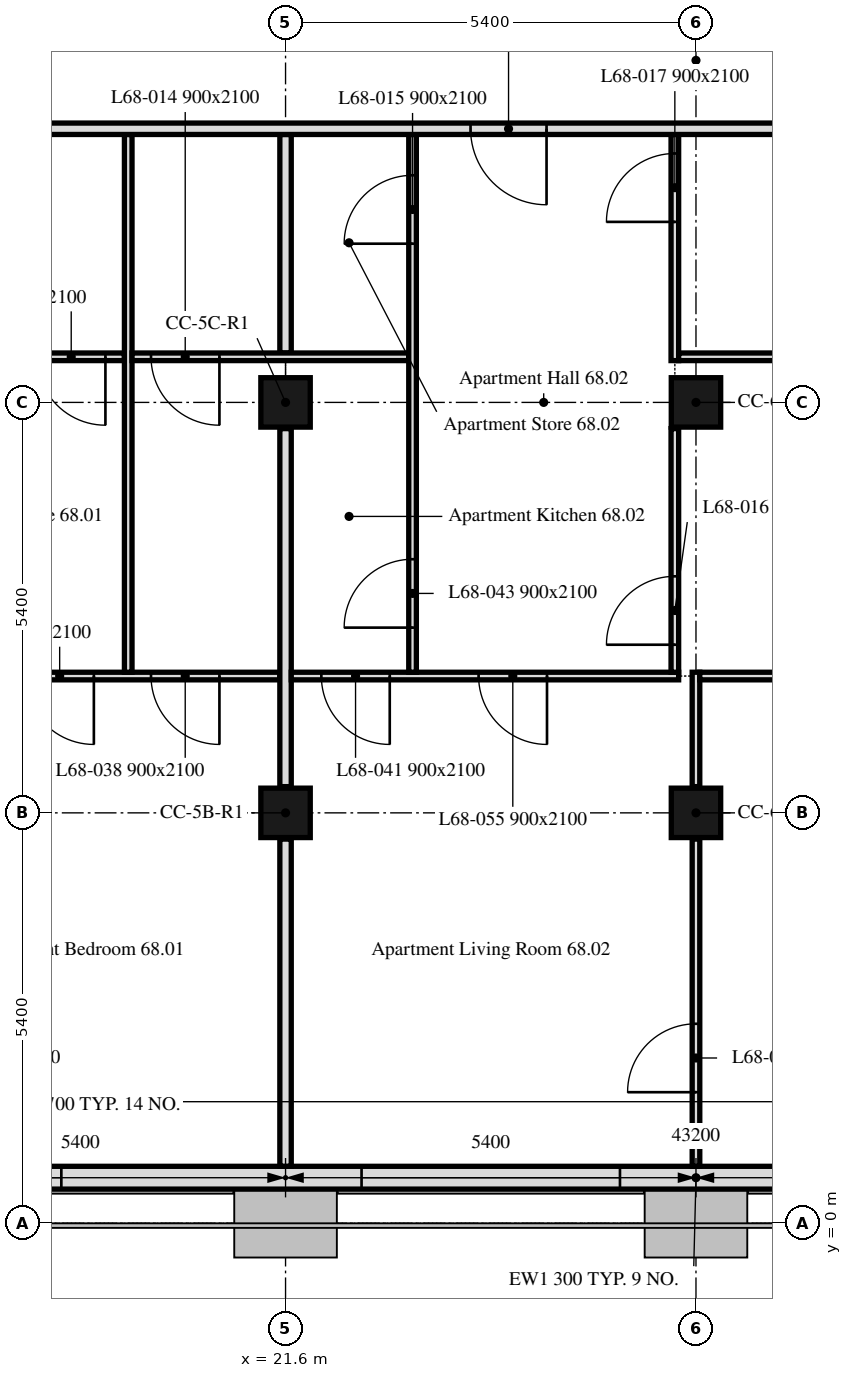
"""IFC4 building model, lengths in metres.
Left out: names, types, materials, properties, quantities, classifications, styles, units other than length and angle.
Written with IfcOpenShell. Run it as: python <this file> out.ifc"""

import sys

from ifc_helpers import new_model, si_unit, direction, frame, frame_2d, origin, origin_2d, place, context, subcontext, project, spatial, rectangle, extrude, element, fill, save


model = new_model("IFC4")
c1 = context("Model", 3, precision=1e-05, world=origin(), true_north=direction((0.0, 1.0)))
c2 = subcontext(c1, "Body", "Model", "MODEL_VIEW")
j1 = project(units=[si_unit("LENGTHUNIT", "METRE"), si_unit("PLANEANGLEUNIT", "RADIAN")], contexts=[c1])
p1 = place(None, origin())
s1 = spatial("IfcSite", under=j1, at=p1, CompositionType="ELEMENT")
p2 = place(p1, origin())
s2 = spatial("IfcBuilding", under=s1, at=p2, CompositionType="ELEMENT")
p3 = place(p2, frame((0.0, 0.0, 278.5)))
s3 = spatial("IfcBuildingStorey", under=s2, at=p3, CompositionType="ELEMENT", Elevation=278.5)
for number, where, z_axis, x_axis in (
    (1, (21.6, 5.4, 0.0), (0.0, 0.0, 1.0), (1.0, 0.0, 0.0)),
    (2, (27.0, 5.4, 0.0), (0.0, 0.0, 1.0), (1.0, 0.0, 0.0)),
    (3, (21.6, 10.8, 0.0), (0.0, 0.0, 1.0), (1.0, 0.0, 0.0)),
    (4, (27.0, 10.8, 0.0), (0.0, 0.0, 1.0), (1.0, 0.0, 0.0)),
):
    element("IfcColumn", number, at=place(p3, frame(where, z_axis=z_axis, x_axis=x_axis)), inside=s3, PredefinedType="COLUMN", context=c2, shape_type="SweptSolid", body=[
        extrude(rectangle(XDim=0.65, YDim=0.65, at=origin_2d()), origin(), (0.0, 0.0, 1.0), 3.0),
    ])
p4 = place(p3, frame((10.986, 0.6, 0.0), z_axis=(0.0, 0.0, 1.0), x_axis=(1.0, 0.0, 0.0)))
e5 = element("IfcWall", 5, at=p4, inside=s3, PredefinedType="SOLIDWALL", context=c2, shape_type="SweptSolid", body=[
    extrude(rectangle(XDim=32.027, YDim=0.3, at=frame_2d((16.014, 0.0))), origin(), (0.0, 0.0, 1.0), 3.0),
])
p5 = place(p4, frame((0.814, 0.0, 0.9)))
e6 = element("IfcOpeningElement", 6, at=p5, cuts=e5, PredefinedType="OPENING", context=c2, shape_type="SweptSolid", body=[
    extrude(rectangle(XDim=3.4, YDim=1.7, at=frame_2d((1.7, 0.85))), frame((0.0, 0.16, 0.0), z_axis=(0.0, -1.0, 0.0), x_axis=(1.0, 0.0, 0.0)), (0.0, 0.0, 1.0), 0.32),
])
p6 = place(p4, frame((6.564, 0.0, 0.9)))
e7 = element("IfcOpeningElement", 7, at=p6, cuts=e5, PredefinedType="OPENING", context=c2, shape_type="SweptSolid", body=[
    extrude(rectangle(XDim=1.1, YDim=1.7, at=frame_2d((0.55, 0.85))), frame((0.0, 0.16, 0.0), z_axis=(0.0, -1.0, 0.0), x_axis=(1.0, 0.0, 0.0)), (0.0, 0.0, 1.0), 0.32),
])
p7 = place(p4, frame((11.614, 0.0, 0.9)))
e8 = element("IfcOpeningElement", 8, at=p7, cuts=e5, PredefinedType="OPENING", context=c2, shape_type="SweptSolid", body=[
    extrude(rectangle(XDim=3.4, YDim=1.7, at=frame_2d((1.7, 0.85))), frame((0.0, 0.16, 0.0), z_axis=(0.0, -1.0, 0.0), x_axis=(1.0, 0.0, 0.0)), (0.0, 0.0, 1.0), 0.32),
])
p8 = place(p4, frame((17.364, 0.0, 0.9)))
e9 = element("IfcOpeningElement", 9, at=p8, cuts=e5, PredefinedType="OPENING", context=c2, shape_type="SweptSolid", body=[
    extrude(rectangle(XDim=1.1, YDim=1.7, at=frame_2d((0.55, 0.85))), frame((0.0, 0.16, 0.0), z_axis=(0.0, -1.0, 0.0), x_axis=(1.0, 0.0, 0.0)), (0.0, 0.0, 1.0), 0.32),
])
p9 = place(p4, frame((22.414, 0.0, 0.9)))
e10 = element("IfcOpeningElement", 10, at=p9, cuts=e5, PredefinedType="OPENING", context=c2, shape_type="SweptSolid", body=[
    extrude(rectangle(XDim=3.4, YDim=1.7, at=frame_2d((1.7, 0.85))), frame((0.0, 0.16, 0.0), z_axis=(0.0, -1.0, 0.0), x_axis=(1.0, 0.0, 0.0)), (0.0, 0.0, 1.0), 0.32),
])
p10 = place(p4, frame((28.164, 0.0, 0.9)))
e11 = element("IfcOpeningElement", 11, at=p10, cuts=e5, PredefinedType="OPENING", context=c2, shape_type="SweptSolid", body=[
    extrude(rectangle(XDim=1.1, YDim=1.7, at=frame_2d((0.55, 0.85))), frame((0.0, 0.16, 0.0), z_axis=(0.0, -1.0, 0.0), x_axis=(1.0, 0.0, 0.0)), (0.0, 0.0, 1.0), 0.32),
])
p11 = place(p3, frame((21.6, 0.751, 0.0), z_axis=(0.0, 0.0, 1.0), x_axis=(0.0, 1.0, 0.0)))
e12 = element("IfcWall", 12, at=p11, inside=s3, PredefinedType="PARTITIONING", context=c2, shape_type="SweptSolid", body=[
    extrude(rectangle(XDim=4.304, YDim=0.15, at=frame_2d((2.152, 0.0))), origin(), (0.0, 0.0, 1.0), 2.4),
])
p12 = place(p3, frame((21.525, 7.2, 0.0), z_axis=(0.0, 0.0, 1.0), x_axis=(-1.0, 0.0, 0.0)))
e13 = element("IfcWall", 13, at=p12, inside=s3, PredefinedType="PARTITIONING", context=c2, shape_type="SweptSolid", body=[
    extrude(rectangle(XDim=5.275, YDim=0.1, at=frame_2d((2.637, 0.0))), origin(), (0.0, 0.0, 1.0), 3.0),
])
p13 = place(p12, frame((2.447, 0.0, 0.0)))
e14 = element("IfcOpeningElement", 14, at=p13, cuts=e13, PredefinedType="OPENING", context=c2, shape_type="SweptSolid", body=[
    extrude(rectangle(XDim=0.9, YDim=2.1, at=frame_2d((0.45, 1.05))), frame((0.0, 0.05, 0.0), z_axis=(0.0, -1.0, 0.0), x_axis=(1.0, 0.0, 0.0)), (0.0, 0.0, 1.0), 0.1),
])
p14 = place(p12, frame((0.795, 0.0, 0.0)))
e15 = element("IfcOpeningElement", 15, at=p14, cuts=e13, PredefinedType="OPENING", context=c2, shape_type="SweptSolid", body=[
    extrude(rectangle(XDim=0.9, YDim=2.1, at=frame_2d((0.45, 1.05))), frame((0.0, 0.05, 0.0), z_axis=(0.0, -1.0, 0.0), x_axis=(1.0, 0.0, 0.0)), (0.0, 0.0, 1.0), 0.1),
])
p15 = place(p3, frame((19.48, 11.4, 0.0), z_axis=(0.0, 0.0, 1.0), x_axis=(-1.0, 0.0, 0.0)))
e16 = element("IfcWall", 16, at=p15, inside=s3, PredefinedType="PARTITIONING", context=c2, shape_type="SweptSolid", body=[
    extrude(rectangle(XDim=3.35, YDim=0.1, at=frame_2d((1.675, 0.0))), origin(), (0.0, 0.0, 1.0), 3.0),
])
p16 = place(p15, frame((0.25, 0.0, 0.0)))
e17 = element("IfcOpeningElement", 17, at=p16, cuts=e16, PredefinedType="OPENING", context=c2, shape_type="SweptSolid", body=[
    extrude(rectangle(XDim=0.9, YDim=2.1, at=frame_2d((0.45, 1.05))), frame((0.0, 0.05, 0.0), z_axis=(0.0, -1.0, 0.0), x_axis=(1.0, 0.0, 0.0)), (0.0, 0.0, 1.0), 0.1),
])
p17 = place(p3, frame((19.53, 7.25, 0.0), z_axis=(0.0, 0.0, 1.0), x_axis=(0.0, 1.0, 0.0)))
e18 = element("IfcWall", 18, at=p17, inside=s3, PredefinedType="PARTITIONING", context=c2, shape_type="SweptSolid", body=[
    extrude(rectangle(XDim=7.075, YDim=0.1, at=frame_2d((3.538, 0.0))), origin(), (0.0, 0.0, 1.0), 3.0),
])
p18 = place(p3, frame((21.6, 5.745, 0.0), z_axis=(0.0, 0.0, 1.0), x_axis=(0.0, 1.0, 0.0)))
e19 = element("IfcWall", 19, at=p18, inside=s3, PredefinedType="PARTITIONING", context=c2, shape_type="SweptSolid", body=[
    extrude(rectangle(XDim=4.71, YDim=0.15, at=frame_2d((2.355, 0.0))), origin(), (0.0, 0.0, 1.0), 2.4),
])
p19 = place(p3, frame((21.6, 11.45, 0.0), z_axis=(0.0, 0.0, 1.0), x_axis=(0.0, 1.0, 0.0)))
e20 = element("IfcWall", 20, at=p19, inside=s3, PredefinedType="PARTITIONING", context=c2, shape_type="SweptSolid", body=[
    extrude(rectangle(XDim=2.875, YDim=0.15, at=frame_2d((1.438, 0.0))), origin(), (0.0, 0.0, 1.0), 2.4),
])
p20 = place(p3, frame((27.0, 0.751, 0.0), z_axis=(0.0, 0.0, 1.0), x_axis=(0.0, 1.0, 0.0)))
e21 = element("IfcWall", 21, at=p20, inside=s3, PredefinedType="PARTITIONING", context=c2, shape_type="SweptSolid", body=[
    extrude(rectangle(XDim=4.304, YDim=0.1, at=frame_2d((2.152, 0.0))), origin(), (0.0, 0.0, 1.0), 2.4),
])
p21 = place(p20, frame((0.974, 0.0, 0.0)))
e22 = element("IfcOpeningElement", 22, at=p21, cuts=e21, PredefinedType="OPENING", context=c2, shape_type="SweptSolid", body=[
    extrude(rectangle(XDim=0.9, YDim=2.1, at=frame_2d((0.45, 1.05))), frame((0.0, 0.05, 0.0), z_axis=(0.0, -1.0, 0.0), x_axis=(1.0, 0.0, 0.0)), (0.0, 0.0, 1.0), 0.1),
])
p22 = place(p3, frame((27.0, 5.745, 0.0), z_axis=(0.0, 0.0, 1.0), x_axis=(0.0, 1.0, 0.0)))
e23 = element("IfcWall", 23, at=p22, inside=s3, PredefinedType="PARTITIONING", context=c2, shape_type="SweptSolid", body=[
    extrude(rectangle(XDim=1.505, YDim=0.1, at=frame_2d((0.752, 0.0))), origin(), (0.0, 0.0, 1.0), 2.4),
])
p23 = place(p3, frame((26.772, 7.2, 0.0), z_axis=(0.0, 0.0, 1.0), x_axis=(-1.0, 0.0, 0.0)))
e24 = element("IfcWall", 24, at=p23, inside=s3, PredefinedType="PARTITIONING", context=c2, shape_type="SweptSolid", body=[
    extrude(rectangle(XDim=5.097, YDim=0.1, at=frame_2d((2.548, 0.0))), origin(), (0.0, 0.0, 1.0), 3.0),
])
p24 = place(p23, frame((3.801, 0.0, 0.0)))
e25 = element("IfcOpeningElement", 25, at=p24, cuts=e24, PredefinedType="OPENING", context=c2, shape_type="SweptSolid", body=[
    extrude(rectangle(XDim=0.9, YDim=2.1, at=frame_2d((0.45, 1.05))), frame((0.0, 0.05, 0.0), z_axis=(0.0, -1.0, 0.0), x_axis=(1.0, 0.0, 0.0)), (0.0, 0.0, 1.0), 0.1),
])
p25 = place(p23, frame((1.732, 0.0, 0.0)))
e26 = element("IfcOpeningElement", 26, at=p25, cuts=e24, PredefinedType="OPENING", context=c2, shape_type="SweptSolid", body=[
    extrude(rectangle(XDim=0.9, YDim=2.1, at=frame_2d((0.45, 1.05))), frame((0.0, 0.05, 0.0), z_axis=(0.0, -1.0, 0.0), x_axis=(1.0, 0.0, 0.0)), (0.0, 0.0, 1.0), 0.1),
])
p26 = place(p3, frame((32.325, 7.2, 0.0), z_axis=(0.0, 0.0, 1.0), x_axis=(-1.0, 0.0, 0.0)))
e27 = element("IfcWall", 27, at=p26, inside=s3, PredefinedType="PARTITIONING", context=c2, shape_type="SweptSolid", body=[
    extrude(rectangle(XDim=5.275, YDim=0.1, at=frame_2d((2.637, 0.0))), origin(), (0.0, 0.0, 1.0), 3.0),
])
p27 = place(p26, frame((1.675, 0.0, 0.0)))
e28 = element("IfcOpeningElement", 28, at=p27, cuts=e27, PredefinedType="OPENING", context=c2, shape_type="SweptSolid", body=[
    extrude(rectangle(XDim=0.9, YDim=2.1, at=frame_2d((0.45, 1.05))), frame((0.0, 0.05, 0.0), z_axis=(0.0, -1.0, 0.0), x_axis=(1.0, 0.0, 0.0)), (0.0, 0.0, 1.0), 0.1),
])
p28 = place(p3, frame((23.221, 11.4, 0.0), z_axis=(0.0, 0.0, 1.0), x_axis=(-1.0, 0.0, 0.0)))
e29 = element("IfcWall", 29, at=p28, inside=s3, PredefinedType="PARTITIONING", context=c2, shape_type="SweptSolid", body=[
    extrude(rectangle(XDim=3.641, YDim=0.1, at=frame_2d((1.82, 0.0))), origin(), (0.0, 0.0, 1.0), 2.4),
])
p29 = place(p28, frame((2.491, 0.0, 0.0)))
e30 = element("IfcOpeningElement", 30, at=p29, cuts=e29, PredefinedType="OPENING", context=c2, shape_type="SweptSolid", body=[
    extrude(rectangle(XDim=0.9, YDim=2.1, at=frame_2d((0.45, 1.05))), frame((0.0, 0.05, 0.0), z_axis=(0.0, -1.0, 0.0), x_axis=(1.0, 0.0, 0.0)), (0.0, 0.0, 1.0), 0.1),
])
p30 = place(p3, frame((23.271, 7.25, 0.0), z_axis=(0.0, 0.0, 1.0), x_axis=(0.0, 1.0, 0.0)))
e31 = element("IfcWall", 31, at=p30, inside=s3, PredefinedType="PARTITIONING", context=c2, shape_type="SweptSolid", body=[
    extrude(rectangle(XDim=7.075, YDim=0.1, at=frame_2d((3.538, 0.0))), origin(), (0.0, 0.0, 1.0), 3.0),
])
p31 = place(p30, frame((5.638, 0.0, 0.0)))
e32 = element("IfcOpeningElement", 32, at=p31, cuts=e31, PredefinedType="OPENING", context=c2, shape_type="SweptSolid", body=[
    extrude(rectangle(XDim=0.9, YDim=2.1, at=frame_2d((0.45, 1.05))), frame((0.0, 0.05, 0.0), z_axis=(0.0, -1.0, 0.0), x_axis=(1.0, 0.0, 0.0)), (0.0, 0.0, 1.0), 0.1),
])
p32 = place(p30, frame((0.587, 0.0, 0.0)))
e33 = element("IfcOpeningElement", 33, at=p32, cuts=e31, PredefinedType="OPENING", context=c2, shape_type="SweptSolid", body=[
    extrude(rectangle(XDim=0.9, YDim=2.1, at=frame_2d((0.45, 1.05))), frame((0.0, 0.05, 0.0), z_axis=(0.0, -1.0, 0.0), x_axis=(1.0, 0.0, 0.0)), (0.0, 0.0, 1.0), 0.1),
])
p33 = place(p3, frame((26.722, 7.25, 0.0), z_axis=(0.0, 0.0, 1.0), x_axis=(0.0, 1.0, 0.0)))
e34 = element("IfcWall", 34, at=p33, inside=s3, PredefinedType="PARTITIONING", context=c2, shape_type="SweptSolid", body=[
    extrude(rectangle(XDim=3.205, YDim=0.1, at=frame_2d((1.603, 0.0))), origin(), (0.0, 0.0, 1.0), 3.0),
])
p34 = place(p33, frame((0.362, 0.0, 0.0)))
e35 = element("IfcOpeningElement", 35, at=p34, cuts=e34, PredefinedType="OPENING", context=c2, shape_type="SweptSolid", body=[
    extrude(rectangle(XDim=0.9, YDim=2.1, at=frame_2d((0.45, 1.05))), frame((0.0, 0.05, 0.0), z_axis=(0.0, -1.0, 0.0), x_axis=(1.0, 0.0, 0.0)), (0.0, 0.0, 1.0), 0.1),
])
p35 = place(p3, frame((26.722, 11.35, 0.0), z_axis=(0.0, 0.0, 1.0), x_axis=(0.0, 1.0, 0.0)))
e36 = element("IfcWall", 36, at=p35, inside=s3, PredefinedType="PARTITIONING", context=c2, shape_type="SweptSolid", body=[
    extrude(rectangle(XDim=2.975, YDim=0.1, at=frame_2d((1.487, 0.0))), origin(), (0.0, 0.0, 1.0), 3.0),
])
p36 = place(p35, frame((1.825, 0.0, 0.0)))
e37 = element("IfcOpeningElement", 37, at=p36, cuts=e36, PredefinedType="OPENING", context=c2, shape_type="SweptSolid", body=[
    extrude(rectangle(XDim=0.9, YDim=2.1, at=frame_2d((0.45, 1.05))), frame((0.0, 0.05, 0.0), z_axis=(0.0, -1.0, 0.0), x_axis=(1.0, 0.0, 0.0)), (0.0, 0.0, 1.0), 0.1),
])
p37 = place(p3, frame((29.4, 11.4, 0.0), z_axis=(0.0, 0.0, 1.0), x_axis=(-1.0, 0.0, 0.0)))
e38 = element("IfcWall", 38, at=p37, inside=s3, PredefinedType="PARTITIONING", context=c2, shape_type="SweptSolid", body=[
    extrude(rectangle(XDim=2.628, YDim=0.1, at=frame_2d((1.314, 0.0))), origin(), (0.0, 0.0, 1.0), 2.4),
])
p38 = place(p3, frame((47.849, 14.4, 0.0), z_axis=(0.0, 0.0, 1.0), x_axis=(-1.0, 0.0, 0.0)))
e39 = element("IfcWall", 39, at=p38, inside=s3, PredefinedType="PARTITIONING", context=c2, shape_type="SweptSolid", body=[
    extrude(rectangle(XDim=41.698, YDim=0.15, at=frame_2d((20.849, 0.0))), origin(), (0.0, 0.0, 1.0), 2.4),
])
p39 = place(p38, frame((10.881, 0.0, 0.0)))
e40 = element("IfcOpeningElement", 40, at=p39, cuts=e39, PredefinedType="OPENING", context=c2, shape_type="SweptSolid", body=[
    extrude(rectangle(XDim=1.0, YDim=2.1, at=frame_2d((0.5, 1.05))), frame((0.0, 0.075, 0.0), z_axis=(0.0, -1.0, 0.0), x_axis=(1.0, 0.0, 0.0)), (0.0, 0.0, 1.0), 0.15),
])
p40 = place(p38, frame((37.759, 0.0, 0.0)))
e41 = element("IfcOpeningElement", 41, at=p40, cuts=e39, PredefinedType="OPENING", context=c2, shape_type="SweptSolid", body=[
    extrude(rectangle(XDim=1.0, YDim=2.1, at=frame_2d((0.5, 1.05))), frame((0.0, 0.075, 0.0), z_axis=(0.0, -1.0, 0.0), x_axis=(1.0, 0.0, 0.0)), (0.0, 0.0, 1.0), 0.15),
])
p41 = place(p38, frame((22.815, 0.0, 0.0)))
e42 = element("IfcOpeningElement", 42, at=p41, cuts=e39, PredefinedType="OPENING", context=c2, shape_type="SweptSolid", body=[
    extrude(rectangle(XDim=1.0, YDim=2.1, at=frame_2d((0.5, 1.05))), frame((0.0, 0.075, 0.0), z_axis=(0.0, -1.0, 0.0), x_axis=(1.0, 0.0, 0.0)), (0.0, 0.0, 1.0), 0.15),
])
p42 = place(p38, frame((4.85, 0.0, 0.0)))
e43 = element("IfcOpeningElement", 43, at=p42, cuts=e39, PredefinedType="OPENING", context=c2, shape_type="SweptSolid", body=[
    extrude(rectangle(XDim=1.0, YDim=2.1, at=frame_2d((0.5, 1.05))), frame((0.0, 0.075, 0.0), z_axis=(0.0, -1.0, 0.0), x_axis=(1.0, 0.0, 0.0)), (0.0, 0.0, 1.0), 0.15),
])
p43 = place(p6, origin())
e44 = element("IfcWindow", 44, at=p43, inside=s3, PartitioningType="SINGLE_PANEL", PredefinedType="WINDOW", context=c2, shape_type="SweptSolid", body=[
    extrude(rectangle(XDim=1.1, YDim=1.7, at=frame_2d((0.55, 0.85))), frame((0.0, 0.03, 0.0), z_axis=(0.0, -1.0, 0.0), x_axis=(1.0, 0.0, 0.0)), (0.0, 0.0, 1.0), 0.06),
])
fill(e7, e44)
p44 = place(p7, origin())
e45 = element("IfcWindow", 45, at=p44, inside=s3, PartitioningType="SINGLE_PANEL", PredefinedType="WINDOW", context=c2, shape_type="SweptSolid", body=[
    extrude(rectangle(XDim=3.4, YDim=1.7, at=frame_2d((1.7, 0.85))), frame((0.0, 0.03, 0.0), z_axis=(0.0, -1.0, 0.0), x_axis=(1.0, 0.0, 0.0)), (0.0, 0.0, 1.0), 0.06),
])
fill(e8, e45)
p45 = place(p16, origin())
e46 = element("IfcDoor", 46, at=p45, inside=s3, OperationType="SINGLE_SWING_RIGHT", PredefinedType="DOOR", context=c2, shape_type="SweptSolid", body=[
    extrude(rectangle(XDim=0.9, YDim=2.1, at=frame_2d((0.45, 1.05))), frame((0.0, 0.025, 0.0), z_axis=(0.0, -1.0, 0.0), x_axis=(1.0, 0.0, 0.0)), (0.0, 0.0, 1.0), 0.05),
])
fill(e17, e46)
p46 = place(p29, origin())
e47 = element("IfcDoor", 47, at=p46, inside=s3, OperationType="SINGLE_SWING_RIGHT", PredefinedType="DOOR", context=c2, shape_type="SweptSolid", body=[
    extrude(rectangle(XDim=0.9, YDim=2.1, at=frame_2d((0.45, 1.05))), frame((0.0, 0.025, 0.0), z_axis=(0.0, -1.0, 0.0), x_axis=(1.0, 0.0, 0.0)), (0.0, 0.0, 1.0), 0.05),
])
fill(e30, e47)
p47 = place(p31, origin())
e48 = element("IfcDoor", 48, at=p47, inside=s3, OperationType="SINGLE_SWING_LEFT", PredefinedType="DOOR", context=c2, shape_type="SweptSolid", body=[
    extrude(rectangle(XDim=0.9, YDim=2.1, at=frame_2d((0.45, 1.05))), frame((0.0, 0.025, 0.0), z_axis=(0.0, -1.0, 0.0), x_axis=(1.0, 0.0, 0.0)), (0.0, 0.0, 1.0), 0.05),
])
fill(e32, e48)
p48 = place(p34, origin())
e49 = element("IfcDoor", 49, at=p48, inside=s3, OperationType="SINGLE_SWING_RIGHT", PredefinedType="DOOR", context=c2, shape_type="SweptSolid", body=[
    extrude(rectangle(XDim=0.9, YDim=2.1, at=frame_2d((0.45, 1.05))), frame((0.0, 0.025, 0.0), z_axis=(0.0, -1.0, 0.0), x_axis=(1.0, 0.0, 0.0)), (0.0, 0.0, 1.0), 0.05),
])
fill(e35, e49)
p49 = place(p36, origin())
e50 = element("IfcDoor", 50, at=p49, inside=s3, OperationType="SINGLE_SWING_RIGHT", PredefinedType="DOOR", context=c2, shape_type="SweptSolid", body=[
    extrude(rectangle(XDim=0.9, YDim=2.1, at=frame_2d((0.45, 1.05))), frame((0.0, 0.025, 0.0), z_axis=(0.0, -1.0, 0.0), x_axis=(1.0, 0.0, 0.0)), (0.0, 0.0, 1.0), 0.05),
])
fill(e37, e50)
p50 = place(p13, origin())
e51 = element("IfcDoor", 51, at=p50, inside=s3, OperationType="SINGLE_SWING_RIGHT", PredefinedType="DOOR", context=c2, shape_type="SweptSolid", body=[
    extrude(rectangle(XDim=0.9, YDim=2.1, at=frame_2d((0.45, 1.05))), frame((0.0, 0.025, 0.0), z_axis=(0.0, -1.0, 0.0), x_axis=(1.0, 0.0, 0.0)), (0.0, 0.0, 1.0), 0.05),
])
fill(e14, e51)
p51 = place(p14, origin())
e52 = element("IfcDoor", 52, at=p51, inside=s3, OperationType="SINGLE_SWING_LEFT", PredefinedType="DOOR", context=c2, shape_type="SweptSolid", body=[
    extrude(rectangle(XDim=0.9, YDim=2.1, at=frame_2d((0.45, 1.05))), frame((0.0, 0.025, 0.0), z_axis=(0.0, -1.0, 0.0), x_axis=(1.0, 0.0, 0.0)), (0.0, 0.0, 1.0), 0.05),
])
fill(e15, e52)
p52 = place(p21, origin())
e53 = element("IfcDoor", 53, at=p52, inside=s3, OperationType="SINGLE_SWING_RIGHT", PredefinedType="DOOR", context=c2, shape_type="SweptSolid", body=[
    extrude(rectangle(XDim=0.9, YDim=2.1, at=frame_2d((0.45, 1.05))), frame((0.0, 0.025, 0.0), z_axis=(0.0, -1.0, 0.0), x_axis=(1.0, 0.0, 0.0)), (0.0, 0.0, 1.0), 0.05),
])
fill(e22, e53)
p53 = place(p24, origin())
e54 = element("IfcDoor", 54, at=p53, inside=s3, OperationType="SINGLE_SWING_RIGHT", PredefinedType="DOOR", context=c2, shape_type="SweptSolid", body=[
    extrude(rectangle(XDim=0.9, YDim=2.1, at=frame_2d((0.45, 1.05))), frame((0.0, 0.025, 0.0), z_axis=(0.0, -1.0, 0.0), x_axis=(1.0, 0.0, 0.0)), (0.0, 0.0, 1.0), 0.05),
])
fill(e25, e54)
p54 = place(p32, origin())
e55 = element("IfcDoor", 55, at=p54, inside=s3, OperationType="SINGLE_SWING_RIGHT", PredefinedType="DOOR", context=c2, shape_type="SweptSolid", body=[
    extrude(rectangle(XDim=0.9, YDim=2.1, at=frame_2d((0.45, 1.05))), frame((0.0, 0.025, 0.0), z_axis=(0.0, -1.0, 0.0), x_axis=(1.0, 0.0, 0.0)), (0.0, 0.0, 1.0), 0.05),
])
fill(e33, e55)
p55 = place(p25, origin())
e56 = element("IfcDoor", 56, at=p55, inside=s3, OperationType="SINGLE_SWING_LEFT", PredefinedType="DOOR", context=c2, shape_type="SweptSolid", body=[
    extrude(rectangle(XDim=0.9, YDim=2.1, at=frame_2d((0.45, 1.05))), frame((0.0, 0.025, 0.0), z_axis=(0.0, -1.0, 0.0), x_axis=(1.0, 0.0, 0.0)), (0.0, 0.0, 1.0), 0.05),
])
fill(e26, e56)
p56 = place(p41, origin())
e57 = element("IfcDoor", 57, at=p56, inside=s3, OperationType="SINGLE_SWING_LEFT", PredefinedType="DOOR", context=c2, shape_type="SweptSolid", body=[
    extrude(rectangle(XDim=1.0, YDim=2.1, at=frame_2d((0.5, 1.05))), frame((0.0, 0.025, 0.0), z_axis=(0.0, -1.0, 0.0), x_axis=(1.0, 0.0, 0.0)), (0.0, 0.0, 1.0), 0.05),
])
fill(e42, e57)
save(model, sys.argv[1])
